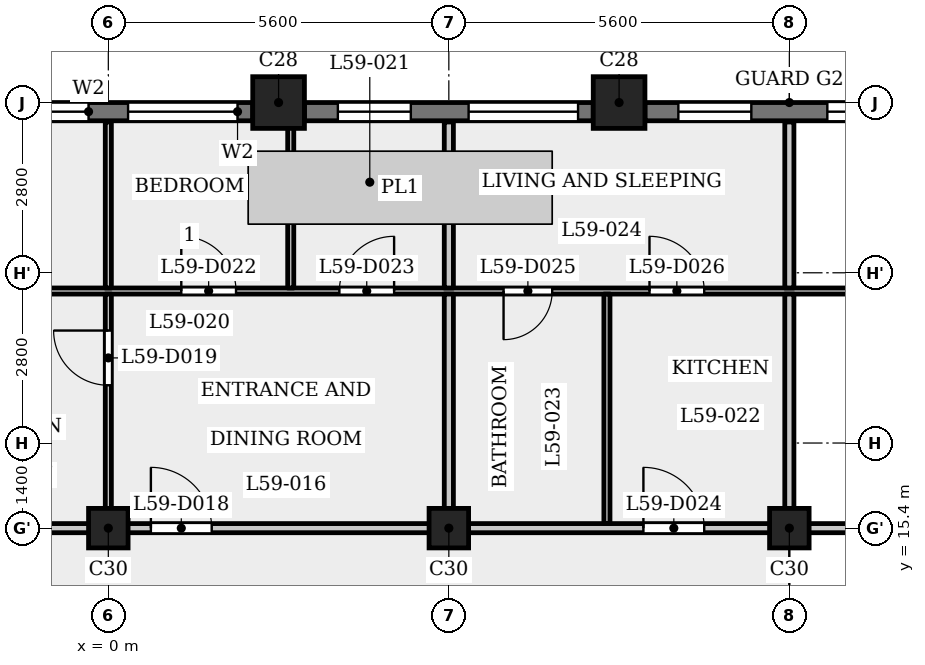
"""IFC4 building model, lengths in metres.
Left out: names, types, materials, properties, quantities, classifications, styles, units other than length and angle.
Written with IfcOpenShell. Run it as: python <this file> out.ifc"""

import sys

from ifc_helpers import new_model, si_unit, direction, frame, frame_2d, origin, origin_2d, place, context, subcontext, project, spatial, rectangle, extrude, element, fill, save


model = new_model("IFC4")
c1 = context("Model", 3, precision=1e-05, world=origin(), true_north=direction((0.0, 1.0)))
c2 = subcontext(c1, "Body", "Model", "MODEL_VIEW")
j1 = project(units=[si_unit("LENGTHUNIT", "METRE"), si_unit("PLANEANGLEUNIT", "RADIAN")], contexts=[c1])
p1 = place(None, origin())
s1 = spatial("IfcSite", under=j1, at=p1, CompositionType="ELEMENT")
p2 = place(p1, origin())
s2 = spatial("IfcBuilding", under=s1, at=p2, CompositionType="ELEMENT")
p3 = place(p2, frame((0.0, 0.0, 227.4)))
s3 = spatial("IfcBuildingStorey", under=s2, at=p3, CompositionType="ELEMENT", Elevation=227.4)
for number, where, z_axis, x_axis in (
    (1, (8.4, 22.4, 0.0), (0.0, 0.0, 1.0), (1.0, 0.0, 0.0)),
    (2, (2.8, 22.4, 0.0), (0.0, 0.0, 1.0), (1.0, 0.0, 0.0)),
):
    element("IfcColumn", number, at=place(p3, frame(where, z_axis=z_axis, x_axis=x_axis)), inside=s3, PredefinedType="COLUMN", context=c2, shape_type="SweptSolid", body=[
        extrude(rectangle(XDim=0.85, YDim=0.85, at=origin_2d()), origin(), (0.0, 0.0, 1.0), 3.5),
    ])
for number, where, z_axis, x_axis in (
    (3, (0.0, 15.4, 0.0), (0.0, 0.0, 1.0), (1.0, 0.0, 0.0)),
    (4, (5.6, 15.4, 0.0), (0.0, 0.0, 1.0), (1.0, 0.0, 0.0)),
    (5, (11.2, 15.4, 0.0), (0.0, 0.0, 1.0), (1.0, 0.0, 0.0)),
):
    element("IfcColumn", number, at=place(p3, frame(where, z_axis=z_axis, x_axis=x_axis)), inside=s3, PredefinedType="COLUMN", context=c2, shape_type="SweptSolid", body=[
        extrude(rectangle(XDim=0.65, YDim=0.65, at=origin_2d()), origin(), (0.0, 0.0, 1.0), 3.5),
    ])
p4 = place(p3, frame((13.575, 22.25, 0.0), z_axis=(0.0, 0.0, 1.0), x_axis=(-1.0, 0.0, 0.0)))
e6 = element("IfcWall", 6, at=p4, inside=s3, PredefinedType="SOLIDWALL", context=c2, shape_type="SweptSolid", body=[
    extrude(rectangle(XDim=4.75, YDim=0.3, at=frame_2d((2.375, 0.0))), origin(), (0.0, 0.0, 1.0), 2.45),
])
p5 = place(p4, frame((0.55, 0.0, 0.6)))
e7 = element("IfcOpeningElement", 7, at=p5, cuts=e6, PredefinedType="OPENING", context=c2, shape_type="SweptSolid", body=[
    extrude(rectangle(XDim=1.2, YDim=1.55, at=frame_2d((0.6, 0.775))), frame((0.0, 0.16, 0.0), z_axis=(0.0, -1.0, 0.0), x_axis=(1.0, 0.0, 0.0)), (0.0, 0.0, 1.0), 0.32),
])
p6 = place(p4, frame((3.0, 0.0, 0.6)))
e8 = element("IfcOpeningElement", 8, at=p6, cuts=e6, PredefinedType="OPENING", context=c2, shape_type="SweptSolid", body=[
    extrude(rectangle(XDim=1.2, YDim=1.55, at=frame_2d((0.6, 0.775))), frame((0.0, 0.16, 0.0), z_axis=(0.0, -1.0, 0.0), x_axis=(1.0, 0.0, 0.0)), (0.0, 0.0, 1.0), 0.32),
])
p7 = place(p3, frame((7.975, 22.25, 0.0), z_axis=(0.0, 0.0, 1.0), x_axis=(-1.0, 0.0, 0.0)))
e9 = element("IfcWall", 9, at=p7, inside=s3, PredefinedType="SOLIDWALL", context=c2, shape_type="SweptSolid", body=[
    extrude(rectangle(XDim=4.75, YDim=0.3, at=frame_2d((2.375, 0.0))), origin(), (0.0, 0.0, 1.0), 2.45),
])
p8 = place(p7, frame((0.25, 0.0, 0.9)))
e10 = element("IfcOpeningElement", 10, at=p8, cuts=e9, PredefinedType="OPENING", context=c2, shape_type="SweptSolid", body=[
    extrude(rectangle(XDim=1.8, YDim=1.25, at=frame_2d((0.9, 0.625))), frame((0.0, 0.16, 0.0), z_axis=(0.0, -1.0, 0.0), x_axis=(1.0, 0.0, 0.0)), (0.0, 0.0, 1.0), 0.32),
])
p9 = place(p7, frame((3.0, 0.0, 0.6)))
e11 = element("IfcOpeningElement", 11, at=p9, cuts=e9, PredefinedType="OPENING", context=c2, shape_type="SweptSolid", body=[
    extrude(rectangle(XDim=1.2, YDim=1.55, at=frame_2d((0.6, 0.775))), frame((0.0, 0.16, 0.0), z_axis=(0.0, -1.0, 0.0), x_axis=(1.0, 0.0, 0.0)), (0.0, 0.0, 1.0), 0.32),
])
p10 = place(p3, frame((2.375, 22.25, 0.0), z_axis=(0.0, 0.0, 1.0), x_axis=(-1.0, 0.0, 0.0)))
e12 = element("IfcWall", 12, at=p10, inside=s3, PredefinedType="SOLIDWALL", context=c2, shape_type="SweptSolid", body=[
    extrude(rectangle(XDim=4.75, YDim=0.3, at=frame_2d((2.375, 0.0))), origin(), (0.0, 0.0, 1.0), 2.45),
])
p11 = place(p10, frame((0.25, 0.0, 0.9)))
e13 = element("IfcOpeningElement", 13, at=p11, cuts=e12, PredefinedType="OPENING", context=c2, shape_type="SweptSolid", body=[
    extrude(rectangle(XDim=1.8, YDim=1.25, at=frame_2d((0.9, 0.625))), frame((0.0, 0.16, 0.0), z_axis=(0.0, -1.0, 0.0), x_axis=(1.0, 0.0, 0.0)), (0.0, 0.0, 1.0), 0.32),
])
p12 = place(p10, frame((2.7, 0.0, 0.9)))
e14 = element("IfcOpeningElement", 14, at=p12, cuts=e12, PredefinedType="OPENING", context=c2, shape_type="SweptSolid", body=[
    extrude(rectangle(XDim=1.8, YDim=1.25, at=frame_2d((0.9, 0.625))), frame((0.0, 0.16, 0.0), z_axis=(0.0, -1.0, 0.0), x_axis=(1.0, 0.0, 0.0)), (0.0, 0.0, 1.0), 0.32),
])
p13 = place(p3, frame((-24.684, 15.4, 0.0), z_axis=(0.0, 0.0, 1.0), x_axis=(1.0, 0.0, 0.0)))
e15 = element("IfcWall", 15, at=p13, inside=s3, PredefinedType="PARTITIONING", context=c2, shape_type="SweptSolid", body=[
    extrude(rectangle(XDim=49.368, YDim=0.15, at=frame_2d((24.684, 0.0))), origin(), (0.0, 0.0, 1.0), 3.15),
])
p14 = place(p13, frame((6.234, 0.0, 0.0)))
e16 = element("IfcOpeningElement", 16, at=p14, cuts=e15, PredefinedType="OPENING", context=c2, shape_type="SweptSolid", body=[
    extrude(rectangle(XDim=1.0, YDim=2.1, at=frame_2d((0.5, 1.05))), frame((0.0, 0.085, 0.0), z_axis=(0.0, -1.0, 0.0), x_axis=(1.0, 0.0, 0.0)), (0.0, 0.0, 1.0), 0.17),
])
p15 = place(p13, frame((17.434, 0.0, 0.0)))
e17 = element("IfcOpeningElement", 17, at=p15, cuts=e15, PredefinedType="OPENING", context=c2, shape_type="SweptSolid", body=[
    extrude(rectangle(XDim=1.0, YDim=2.1, at=frame_2d((0.5, 1.05))), frame((0.0, 0.085, 0.0), z_axis=(0.0, -1.0, 0.0), x_axis=(1.0, 0.0, 0.0)), (0.0, 0.0, 1.0), 0.17),
])
p16 = place(p13, frame((25.384, 0.0, 0.0)))
e18 = element("IfcOpeningElement", 18, at=p16, cuts=e15, PredefinedType="OPENING", context=c2, shape_type="SweptSolid", body=[
    extrude(rectangle(XDim=1.0, YDim=2.1, at=frame_2d((0.5, 1.05))), frame((0.0, 0.085, 0.0), z_axis=(0.0, -1.0, 0.0), x_axis=(1.0, 0.0, 0.0)), (0.0, 0.0, 1.0), 0.17),
])
p17 = place(p13, frame((33.484, 0.0, 0.0)))
e19 = element("IfcOpeningElement", 19, at=p17, cuts=e15, PredefinedType="OPENING", context=c2, shape_type="SweptSolid", body=[
    extrude(rectangle(XDim=1.0, YDim=2.1, at=frame_2d((0.5, 1.05))), frame((0.0, 0.085, 0.0), z_axis=(0.0, -1.0, 0.0), x_axis=(1.0, 0.0, 0.0)), (0.0, 0.0, 1.0), 0.17),
])
p18 = place(p13, frame((47.225, 0.0, 0.0)))
e20 = element("IfcOpeningElement", 20, at=p18, cuts=e15, PredefinedType="OPENING", context=c2, shape_type="SweptSolid", body=[
    extrude(rectangle(XDim=1.0, YDim=2.1, at=frame_2d((0.5, 1.05))), frame((0.0, 0.085, 0.0), z_axis=(0.0, -1.0, 0.0), x_axis=(1.0, 0.0, 0.0)), (0.0, 0.0, 1.0), 0.17),
])
p19 = place(p3, frame((-22.256, 19.3, 0.0), z_axis=(0.0, 0.0, 1.0), x_axis=(1.0, 0.0, 0.0)))
e21 = element("IfcWall", 21, at=p19, inside=s3, PredefinedType="PARTITIONING", context=c2, shape_type="SweptSolid", body=[
    extrude(rectangle(XDim=44.511, YDim=0.1, at=frame_2d((22.256, 0.0))), origin(), (0.0, 0.0, 1.0), 3.15),
])
p20 = place(p19, frame((9.606, 0.0, 0.0)))
e22 = element("IfcOpeningElement", 22, at=p20, cuts=e21, PredefinedType="OPENING", context=c2, shape_type="SweptSolid", body=[
    extrude(rectangle(XDim=0.8, YDim=2.1, at=frame_2d((0.4, 1.05))), frame((0.0, 0.06, 0.0), z_axis=(0.0, -1.0, 0.0), x_axis=(1.0, 0.0, 0.0)), (0.0, 0.0, 1.0), 0.12),
])
p21 = place(p19, frame((3.906, 0.0, 0.0)))
e23 = element("IfcOpeningElement", 23, at=p21, cuts=e21, PredefinedType="OPENING", context=c2, shape_type="SweptSolid", body=[
    extrude(rectangle(XDim=0.9, YDim=2.1, at=frame_2d((0.45, 1.05))), frame((0.0, 0.06, 0.0), z_axis=(0.0, -1.0, 0.0), x_axis=(1.0, 0.0, 0.0)), (0.0, 0.0, 1.0), 0.12),
])
p22 = place(p19, frame((11.706, 0.0, 0.0)))
e24 = element("IfcOpeningElement", 24, at=p22, cuts=e21, PredefinedType="OPENING", context=c2, shape_type="SweptSolid", body=[
    extrude(rectangle(XDim=0.8, YDim=2.1, at=frame_2d((0.4, 1.05))), frame((0.0, 0.06, 0.0), z_axis=(0.0, -1.0, 0.0), x_axis=(1.0, 0.0, 0.0)), (0.0, 0.0, 1.0), 0.12),
])
p23 = place(p19, frame((15.106, 0.0, 0.0)))
e25 = element("IfcOpeningElement", 25, at=p23, cuts=e21, PredefinedType="OPENING", context=c2, shape_type="SweptSolid", body=[
    extrude(rectangle(XDim=0.9, YDim=2.1, at=frame_2d((0.45, 1.05))), frame((0.0, 0.06, 0.0), z_axis=(0.0, -1.0, 0.0), x_axis=(1.0, 0.0, 0.0)), (0.0, 0.0, 1.0), 0.12),
])
p24 = place(p19, frame((17.556, 0.0, 0.0)))
e26 = element("IfcOpeningElement", 26, at=p24, cuts=e21, PredefinedType="OPENING", context=c2, shape_type="SweptSolid", body=[
    extrude(rectangle(XDim=0.8, YDim=2.1, at=frame_2d((0.4, 1.05))), frame((0.0, 0.06, 0.0), z_axis=(0.0, -1.0, 0.0), x_axis=(1.0, 0.0, 0.0)), (0.0, 0.0, 1.0), 0.12),
])
p25 = place(p19, frame((19.956, 0.0, 0.0)))
e27 = element("IfcOpeningElement", 27, at=p25, cuts=e21, PredefinedType="OPENING", context=c2, shape_type="SweptSolid", body=[
    extrude(rectangle(XDim=0.9, YDim=2.1, at=frame_2d((0.45, 1.05))), frame((0.0, 0.06, 0.0), z_axis=(0.0, -1.0, 0.0), x_axis=(1.0, 0.0, 0.0)), (0.0, 0.0, 1.0), 0.12),
])
p26 = place(p19, frame((23.456, 0.0, 0.0)))
e28 = element("IfcOpeningElement", 28, at=p26, cuts=e21, PredefinedType="OPENING", context=c2, shape_type="SweptSolid", body=[
    extrude(rectangle(XDim=0.9, YDim=2.1, at=frame_2d((0.45, 1.05))), frame((0.0, 0.06, 0.0), z_axis=(0.0, -1.0, 0.0), x_axis=(1.0, 0.0, 0.0)), (0.0, 0.0, 1.0), 0.12),
])
p27 = place(p19, frame((26.056, 0.0, 0.0)))
e29 = element("IfcOpeningElement", 29, at=p27, cuts=e21, PredefinedType="OPENING", context=c2, shape_type="SweptSolid", body=[
    extrude(rectangle(XDim=0.9, YDim=2.1, at=frame_2d((0.45, 1.05))), frame((0.0, 0.06, 0.0), z_axis=(0.0, -1.0, 0.0), x_axis=(1.0, 0.0, 0.0)), (0.0, 0.0, 1.0), 0.12),
])
p28 = place(p19, frame((28.756, 0.0, 0.0)))
e30 = element("IfcOpeningElement", 30, at=p28, cuts=e21, PredefinedType="OPENING", context=c2, shape_type="SweptSolid", body=[
    extrude(rectangle(XDim=0.8, YDim=2.1, at=frame_2d((0.4, 1.05))), frame((0.0, 0.06, 0.0), z_axis=(0.0, -1.0, 0.0), x_axis=(1.0, 0.0, 0.0)), (0.0, 0.0, 1.0), 0.12),
])
p29 = place(p19, frame((31.156, 0.0, 0.0)))
e31 = element("IfcOpeningElement", 31, at=p29, cuts=e21, PredefinedType="OPENING", context=c2, shape_type="SweptSolid", body=[
    extrude(rectangle(XDim=0.9, YDim=2.1, at=frame_2d((0.45, 1.05))), frame((0.0, 0.06, 0.0), z_axis=(0.0, -1.0, 0.0), x_axis=(1.0, 0.0, 0.0)), (0.0, 0.0, 1.0), 0.12),
])
p30 = place(p19, frame((37.606, 0.0, 0.0)))
e32 = element("IfcOpeningElement", 32, at=p30, cuts=e21, PredefinedType="OPENING", context=c2, shape_type="SweptSolid", body=[
    extrude(rectangle(XDim=0.8, YDim=2.1, at=frame_2d((0.4, 1.05))), frame((0.0, 0.06, 0.0), z_axis=(0.0, -1.0, 0.0), x_axis=(1.0, 0.0, 0.0)), (0.0, 0.0, 1.0), 0.12),
])
p31 = place(p19, frame((42.028, 0.0, 0.0)))
e33 = element("IfcOpeningElement", 33, at=p31, cuts=e21, PredefinedType="OPENING", context=c2, shape_type="SweptSolid", body=[
    extrude(rectangle(XDim=0.9, YDim=2.1, at=frame_2d((0.45, 1.05))), frame((0.0, 0.06, 0.0), z_axis=(0.0, -1.0, 0.0), x_axis=(1.0, 0.0, 0.0)), (0.0, 0.0, 1.0), 0.12),
])
p32 = place(p3, frame((0.0, 15.475, 0.0), z_axis=(0.0, 0.0, 1.0), x_axis=(0.0, 1.0, 0.0)))
e34 = element("IfcWall", 34, at=p32, inside=s3, PredefinedType="PARTITIONING", context=c2, shape_type="SweptSolid", body=[
    extrude(rectangle(XDim=3.775, YDim=0.1, at=frame_2d((1.887, 0.0))), origin(), (0.0, 0.0, 1.0), 3.15),
])
p33 = place(p32, frame((2.275, 0.0, 0.0)))
e35 = element("IfcOpeningElement", 35, at=p33, cuts=e34, PredefinedType="OPENING", context=c2, shape_type="SweptSolid", body=[
    extrude(rectangle(XDim=0.9, YDim=2.1, at=frame_2d((0.45, 1.05))), frame((0.0, 0.06, 0.0), z_axis=(0.0, -1.0, 0.0), x_axis=(1.0, 0.0, 0.0)), (0.0, 0.0, 1.0), 0.12),
])
p34 = place(p3, frame((0.0, 19.35, 0.0), z_axis=(0.0, 0.0, 1.0), x_axis=(0.0, 1.0, 0.0)))
e36 = element("IfcWall", 36, at=p34, inside=s3, PredefinedType="PARTITIONING", context=c2, shape_type="SweptSolid", body=[
    extrude(rectangle(XDim=2.73, YDim=0.1, at=frame_2d((1.365, 0.0))), origin(), (0.0, 0.0, 1.0), 3.15),
])
p35 = place(p3, frame((3.0, 19.35, 0.0), z_axis=(0.0, 0.0, 1.0), x_axis=(0.0, 1.0, 0.0)))
e37 = element("IfcWall", 37, at=p35, inside=s3, PredefinedType="PARTITIONING", context=c2, shape_type="SweptSolid", body=[
    extrude(rectangle(XDim=3.455, YDim=0.1, at=frame_2d((1.728, 0.0))), origin(), (0.0, 0.0, 1.0), 3.15),
])
p36 = place(p3, frame((5.6, 15.475, 0.0), z_axis=(0.0, 0.0, 1.0), x_axis=(0.0, 1.0, 0.0)))
e38 = element("IfcWall", 38, at=p36, inside=s3, PredefinedType="PARTITIONING", context=c2, shape_type="SweptSolid", body=[
    extrude(rectangle(XDim=3.775, YDim=0.15, at=frame_2d((1.887, 0.0))), origin(), (0.0, 0.0, 1.0), 3.15),
])
p37 = place(p3, frame((5.6, 19.35, 0.0), z_axis=(0.0, 0.0, 1.0), x_axis=(0.0, 1.0, 0.0)))
e39 = element("IfcWall", 39, at=p37, inside=s3, PredefinedType="PARTITIONING", context=c2, shape_type="SweptSolid", body=[
    extrude(rectangle(XDim=2.73, YDim=0.15, at=frame_2d((1.365, 0.0))), origin(), (0.0, 0.0, 1.0), 3.15),
])
p38 = place(p3, frame((8.2, 15.475, 0.0), z_axis=(0.0, 0.0, 1.0), x_axis=(0.0, 1.0, 0.0)))
e40 = element("IfcWall", 40, at=p38, inside=s3, PredefinedType="PARTITIONING", context=c2, shape_type="SweptSolid", body=[
    extrude(rectangle(XDim=3.775, YDim=0.1, at=frame_2d((1.887, 0.0))), origin(), (0.0, 0.0, 1.0), 3.15),
])
p39 = place(p3, frame((11.2, 15.475, 0.0), z_axis=(0.0, 0.0, 1.0), x_axis=(0.0, 1.0, 0.0)))
e41 = element("IfcWall", 41, at=p39, inside=s3, PredefinedType="PARTITIONING", context=c2, shape_type="SweptSolid", body=[
    extrude(rectangle(XDim=3.775, YDim=0.15, at=frame_2d((1.887, 0.0))), origin(), (0.0, 0.0, 1.0), 3.15),
])
p40 = place(p3, frame((11.2, 19.35, 0.0), z_axis=(0.0, 0.0, 1.0), x_axis=(0.0, 1.0, 0.0)))
e42 = element("IfcWall", 42, at=p40, inside=s3, PredefinedType="PARTITIONING", context=c2, shape_type="SweptSolid", body=[
    extrude(rectangle(XDim=2.73, YDim=0.15, at=frame_2d((1.365, 0.0))), origin(), (0.0, 0.0, 1.0), 3.15),
])
p41 = place(p16, origin())
e43 = element("IfcDoor", 43, at=p41, inside=s3, OperationType="SINGLE_SWING_RIGHT", PredefinedType="DOOR", context=c2, shape_type="SweptSolid", body=[
    extrude(rectangle(XDim=1.0, YDim=2.1, at=frame_2d((0.5, 1.05))), frame((0.0, 0.025, 0.0), z_axis=(0.0, -1.0, 0.0), x_axis=(1.0, 0.0, 0.0)), (0.0, 0.0, 1.0), 0.05),
])
fill(e18, e43)
p42 = place(p33, origin())
e44 = element("IfcDoor", 44, at=p42, inside=s3, OperationType="SINGLE_SWING_LEFT", PredefinedType="DOOR", context=c2, shape_type="SweptSolid", body=[
    extrude(rectangle(XDim=0.9, YDim=2.1, at=frame_2d((0.45, 1.05))), frame((0.0, 0.025, 0.0), z_axis=(0.0, -1.0, 0.0), x_axis=(1.0, 0.0, 0.0)), (0.0, 0.0, 1.0), 0.05),
])
fill(e35, e44)
p43 = place(p26, origin())
e45 = element("IfcDoor", 45, at=p43, inside=s3, OperationType="SINGLE_SWING_RIGHT", PredefinedType="DOOR", context=c2, shape_type="SweptSolid", body=[
    extrude(rectangle(XDim=0.9, YDim=2.1, at=frame_2d((0.45, 1.05))), frame((0.0, 0.025, 0.0), z_axis=(0.0, -1.0, 0.0), x_axis=(1.0, 0.0, 0.0)), (0.0, 0.0, 1.0), 0.05),
])
fill(e28, e45)
p44 = place(p27, origin())
e46 = element("IfcDoor", 46, at=p44, inside=s3, OperationType="SINGLE_SWING_LEFT", PredefinedType="DOOR", context=c2, shape_type="SweptSolid", body=[
    extrude(rectangle(XDim=0.9, YDim=2.1, at=frame_2d((0.45, 1.05))), frame((0.0, 0.025, 0.0), z_axis=(0.0, -1.0, 0.0), x_axis=(1.0, 0.0, 0.0)), (0.0, 0.0, 1.0), 0.05),
])
fill(e29, e46)
p45 = place(p17, origin())
e47 = element("IfcDoor", 47, at=p45, inside=s3, OperationType="SINGLE_SWING_RIGHT", PredefinedType="DOOR", context=c2, shape_type="SweptSolid", body=[
    extrude(rectangle(XDim=1.0, YDim=2.1, at=frame_2d((0.5, 1.05))), frame((0.0, 0.025, 0.0), z_axis=(0.0, -1.0, 0.0), x_axis=(1.0, 0.0, 0.0)), (0.0, 0.0, 1.0), 0.05),
])
fill(e19, e47)
p46 = place(p28, origin())
e48 = element("IfcDoor", 48, at=p46, inside=s3, OperationType="SINGLE_SWING_LEFT", PredefinedType="DOOR", context=c2, shape_type="SweptSolid", body=[
    extrude(rectangle(XDim=0.8, YDim=2.1, at=frame_2d((0.4, 1.05))), frame((0.0, 0.025, 0.0), z_axis=(0.0, -1.0, 0.0), x_axis=(1.0, 0.0, 0.0)), (0.0, 0.0, 1.0), 0.05),
])
fill(e30, e48)
p47 = place(p29, origin())
e49 = element("IfcDoor", 49, at=p47, inside=s3, OperationType="SINGLE_SWING_RIGHT", PredefinedType="DOOR", context=c2, shape_type="SweptSolid", body=[
    extrude(rectangle(XDim=0.9, YDim=2.1, at=frame_2d((0.45, 1.05))), frame((0.0, 0.025, 0.0), z_axis=(0.0, -1.0, 0.0), x_axis=(1.0, 0.0, 0.0)), (0.0, 0.0, 1.0), 0.05),
])
fill(e31, e49)
p48 = place(p5, origin())
e50 = element("IfcWindow", 50, at=p48, inside=s3, PartitioningType="SINGLE_PANEL", PredefinedType="WINDOW", context=c2, shape_type="SweptSolid", body=[
    extrude(rectangle(XDim=1.2, YDim=1.55, at=frame_2d((0.6, 0.775))), frame((0.0, 0.03, 0.0), z_axis=(0.0, -1.0, 0.0), x_axis=(1.0, 0.0, 0.0)), (0.0, 0.0, 1.0), 0.06),
])
fill(e7, e50)
p49 = place(p6, origin())
e51 = element("IfcWindow", 51, at=p49, inside=s3, PartitioningType="SINGLE_PANEL", PredefinedType="WINDOW", context=c2, shape_type="SweptSolid", body=[
    extrude(rectangle(XDim=1.2, YDim=1.55, at=frame_2d((0.6, 0.775))), frame((0.0, 0.03, 0.0), z_axis=(0.0, -1.0, 0.0), x_axis=(1.0, 0.0, 0.0)), (0.0, 0.0, 1.0), 0.06),
])
fill(e8, e51)
p50 = place(p8, origin())
e52 = element("IfcWindow", 52, at=p50, inside=s3, PartitioningType="SINGLE_PANEL", PredefinedType="WINDOW", context=c2, shape_type="SweptSolid", body=[
    extrude(rectangle(XDim=1.8, YDim=1.25, at=frame_2d((0.9, 0.625))), frame((0.0, 0.03, 0.0), z_axis=(0.0, -1.0, 0.0), x_axis=(1.0, 0.0, 0.0)), (0.0, 0.0, 1.0), 0.06),
])
fill(e10, e52)
p51 = place(p9, origin())
e53 = element("IfcWindow", 53, at=p51, inside=s3, PartitioningType="SINGLE_PANEL", PredefinedType="WINDOW", context=c2, shape_type="SweptSolid", body=[
    extrude(rectangle(XDim=1.2, YDim=1.55, at=frame_2d((0.6, 0.775))), frame((0.0, 0.03, 0.0), z_axis=(0.0, -1.0, 0.0), x_axis=(1.0, 0.0, 0.0)), (0.0, 0.0, 1.0), 0.06),
])
fill(e11, e53)
p52 = place(p11, origin())
e54 = element("IfcWindow", 54, at=p52, inside=s3, PartitioningType="SINGLE_PANEL", PredefinedType="WINDOW", context=c2, shape_type="SweptSolid", body=[
    extrude(rectangle(XDim=1.8, YDim=1.25, at=frame_2d((0.9, 0.625))), frame((0.0, 0.03, 0.0), z_axis=(0.0, -1.0, 0.0), x_axis=(1.0, 0.0, 0.0)), (0.0, 0.0, 1.0), 0.06),
])
fill(e13, e54)
p53 = place(p12, origin())
e55 = element("IfcWindow", 55, at=p53, inside=s3, PartitioningType="SINGLE_PANEL", PredefinedType="WINDOW", context=c2, shape_type="SweptSolid", body=[
    extrude(rectangle(XDim=1.8, YDim=1.25, at=frame_2d((0.9, 0.625))), frame((0.0, 0.03, 0.0), z_axis=(0.0, -1.0, 0.0), x_axis=(1.0, 0.0, 0.0)), (0.0, 0.0, 1.0), 0.06),
])
fill(e14, e55)
save(model, sys.argv[1])
